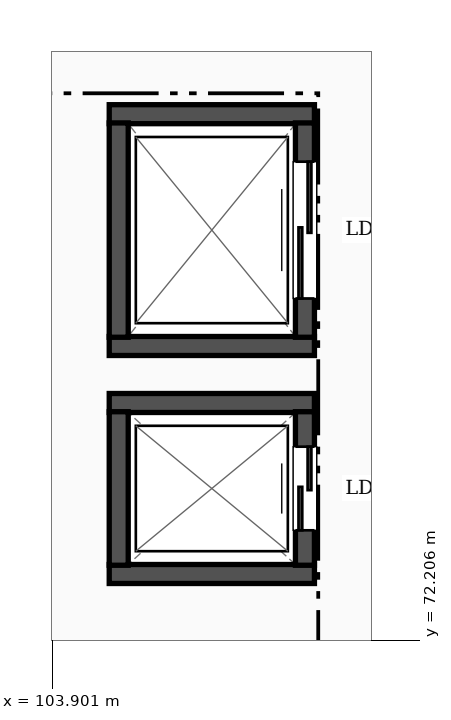
"""IFC4 building model, lengths in metres.
Left out: names, types, materials, properties, quantities, classifications, styles, units other than length and angle.
Written with IfcOpenShell. Run it as: python <this file> out.ifc"""

import sys

from ifc_helpers import new_model, si_unit, direction, frame, frame_2d, origin, place, context, subcontext, project, spatial, rectangle, extrude, element, fill, save


model = new_model("IFC4")
c1 = context("Model", 3, precision=1e-05, world=origin(), true_north=direction((0.0, 1.0)))
c2 = subcontext(c1, "Body", "Model", "MODEL_VIEW")
j1 = project(units=[si_unit("LENGTHUNIT", "METRE"), si_unit("PLANEANGLEUNIT", "RADIAN")], contexts=[c1])
p1 = place(None, origin())
s1 = spatial("IfcSite", under=j1, at=p1, CompositionType="ELEMENT")
p2 = place(p1, origin())
s2 = spatial("IfcBuilding", under=s1, at=p2, CompositionType="ELEMENT")
p3 = place(p2, frame((0.0, 0.0, 6.0)))
s3 = spatial("IfcBuildingStorey", under=s2, at=p3, CompositionType="ELEMENT", Elevation=6.0)
for number, where, z_axis, x_axis in (
    (1, (104.65, 73.075, 0.0), (0.0, 0.0, 1.0), (1.0, 0.0, 0.0)),
    (2, (104.65, 75.325, 0.0), (0.0, 0.0, 1.0), (1.0, 0.0, 0.0)),
):
    element("IfcWall", number, at=place(p3, frame(where, z_axis=z_axis, x_axis=x_axis)), inside=s3, PredefinedType="SHEAR", context=c2, shape_type="SweptSolid", body=[
        extrude(rectangle(XDim=2.7, YDim=0.25, at=frame_2d((1.35, 0.0))), origin(), (0.0, 0.0, 1.0), 4.8),
    ])
p4 = place(p3, frame((104.775, 73.19, 0.0), z_axis=(0.0, 0.0, 1.0), x_axis=(0.0, 1.0, 0.0)))
e3 = element("IfcWall", 3, at=p4, inside=s3, PredefinedType="SHEAR", context=c2, shape_type="SweptSolid", body=[
    extrude(rectangle(XDim=2.02, YDim=0.25, at=frame_2d((1.01, 0.0))), origin(), (0.0, 0.0, 1.0), 4.8),
])
p5 = place(p3, frame((107.225, 73.19, 0.0), z_axis=(0.0, 0.0, 1.0), x_axis=(0.0, 1.0, 0.0)))
e4 = element("IfcWall", 4, at=p5, inside=s3, PredefinedType="SHEAR", context=c2, shape_type="SweptSolid", body=[
    extrude(rectangle(XDim=2.02, YDim=0.25, at=frame_2d((1.01, 0.0))), origin(), (0.0, 0.0, 1.0), 4.8),
])
p6 = place(p5, frame((0.46, 0.0, 0.0)))
e5 = element("IfcOpeningElement", 5, at=p6, cuts=e4, PredefinedType="OPENING", context=c2, shape_type="SweptSolid", body=[
    extrude(rectangle(XDim=1.1, YDim=2.2, at=frame_2d((0.55, 1.1))), frame((0.0, 0.135, 0.0), z_axis=(0.0, -1.0, 0.0), x_axis=(1.0, 0.0, 0.0)), (0.0, 0.0, 1.0), 0.27),
])
for number, where, z_axis, x_axis in (
    (6, (104.65, 76.075, 0.0), (0.0, 0.0, 1.0), (1.0, 0.0, 0.0)),
    (7, (104.65, 79.125, 0.0), (0.0, 0.0, 1.0), (1.0, 0.0, 0.0)),
):
    element("IfcWall", number, at=place(p3, frame(where, z_axis=z_axis, x_axis=x_axis)), inside=s3, PredefinedType="SHEAR", context=c2, shape_type="SweptSolid", body=[
        extrude(rectangle(XDim=2.7, YDim=0.25, at=frame_2d((1.35, 0.0))), origin(), (0.0, 0.0, 1.0), 4.8),
    ])
p7 = place(p3, frame((104.775, 76.19, 0.0), z_axis=(0.0, 0.0, 1.0), x_axis=(0.0, 1.0, 0.0)))
e8 = element("IfcWall", 8, at=p7, inside=s3, PredefinedType="SHEAR", context=c2, shape_type="SweptSolid", body=[
    extrude(rectangle(XDim=2.82, YDim=0.25, at=frame_2d((1.41, 0.0))), origin(), (0.0, 0.0, 1.0), 4.8),
])
p8 = place(p3, frame((107.225, 76.19, 0.0), z_axis=(0.0, 0.0, 1.0), x_axis=(0.0, 1.0, 0.0)))
e9 = element("IfcWall", 9, at=p8, inside=s3, PredefinedType="SHEAR", context=c2, shape_type="SweptSolid", body=[
    extrude(rectangle(XDim=2.82, YDim=0.25, at=frame_2d((1.41, 0.0))), origin(), (0.0, 0.0, 1.0), 4.8),
])
p9 = place(p8, frame((0.51, 0.0, 0.0)))
e10 = element("IfcOpeningElement", 10, at=p9, cuts=e9, PredefinedType="OPENING", context=c2, shape_type="SweptSolid", body=[
    extrude(rectangle(XDim=1.8, YDim=2.4, at=frame_2d((0.9, 1.2))), frame((0.0, 0.135, 0.0), z_axis=(0.0, -1.0, 0.0), x_axis=(1.0, 0.0, 0.0)), (0.0, 0.0, 1.0), 0.27),
])
p10 = place(p6, origin())
e11 = element("IfcDoor", 11, at=p10, inside=s3, OperationType="DOUBLE_DOOR_SLIDING", PredefinedType="DOOR", context=c2, shape_type="SweptSolid", body=[
    extrude(rectangle(XDim=1.1, YDim=2.2, at=frame_2d((0.55, 1.1))), frame((0.0, 0.025, 0.0), z_axis=(0.0, -1.0, 0.0), x_axis=(1.0, 0.0, 0.0)), (0.0, 0.0, 1.0), 0.05),
])
fill(e5, e11)
p11 = place(p9, origin())
e12 = element("IfcDoor", 12, at=p11, inside=s3, OperationType="DOUBLE_DOOR_SLIDING", PredefinedType="DOOR", context=c2, shape_type="SweptSolid", body=[
    extrude(rectangle(XDim=1.8, YDim=2.4, at=frame_2d((0.9, 1.2))), frame((0.0, 0.025, 0.0), z_axis=(0.0, -1.0, 0.0), x_axis=(1.0, 0.0, 0.0)), (0.0, 0.0, 1.0), 0.05),
])
fill(e10, e12)
save(model, sys.argv[1])
